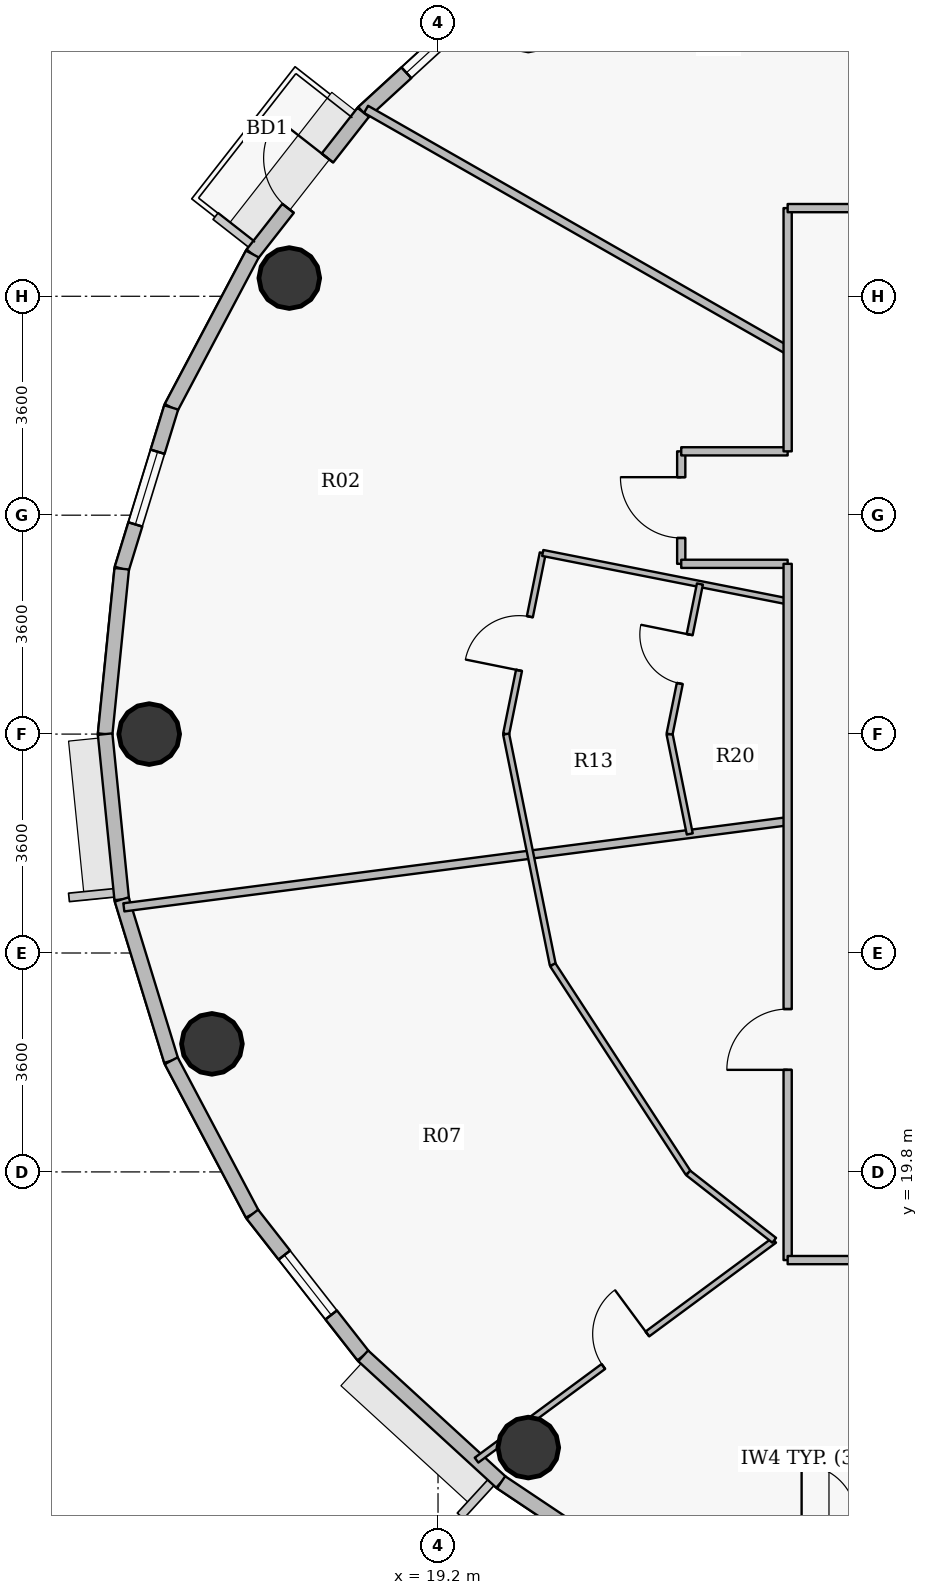
"""IFC4 building model, lengths in metres.
Left out: names, types, materials, properties, quantities, classifications, styles, units other than length and angle.
Written with IfcOpenShell. Run it as: python <this file> out.ifc"""

import sys

from ifc_helpers import new_model, si_unit, direction, frame, frame_2d, origin, origin_2d, place, context, subcontext, project, spatial, rectangle, hollow_circle, extrude, source, transform, mapped, element, fill, save


model = new_model("IFC4")
c1 = context("Model", 3, precision=1e-05, world=origin(), true_north=direction((0.0, 1.0)))
c2 = subcontext(c1, "Body", "Model", "MODEL_VIEW")
j1 = project(units=[si_unit("LENGTHUNIT", "METRE"), si_unit("PLANEANGLEUNIT", "RADIAN")], contexts=[c1])
p1 = place(None, origin())
s1 = spatial("IfcSite", under=j1, at=p1, CompositionType="ELEMENT")
p2 = place(p1, origin())
s2 = spatial("IfcBuilding", under=s1, at=p2, CompositionType="ELEMENT")
p3 = place(p2, frame((0.0, 0.0, 299.25)))
s3 = spatial("IfcBuildingStorey", under=s2, at=p3, CompositionType="ELEMENT", Elevation=299.25)
for number, where, z_axis, x_axis in (
    (1, (16.754, 34.5, 0.0), (0.0, 0.0, 1.0), (1.0, 0.0, 0.0)),
    (2, (14.45, 27.0, 0.0), (0.0, 0.0, 1.0), (1.0, 0.0, 0.0)),
    (3, (15.481, 21.906, 0.0), (0.0, 0.0, 1.0), (1.0, 0.0, 0.0)),
    (4, (20.685, 15.267, 0.0), (0.0, 0.0, 1.0), (1.0, 0.0, 0.0)),
):
    element("IfcColumn", number, at=place(p3, frame(where, z_axis=z_axis, x_axis=x_axis)), inside=s3, PredefinedType="COLUMN", context=c2, shape_type="SweptSolid", body=[
        extrude(hollow_circle(Radius=0.5, WallThickness=0.032, at=origin_2d()), origin(), (0.0, 0.0, 1.0), 3.75),
    ])
p4 = place(p3, frame((17.97, 37.225, 0.0), z_axis=(0.0, 0.0, 1.0), x_axis=(0.737068506972, 0.675818034703, 0.0)))
e5 = element("IfcWall", 5, at=p4, inside=s3, PredefinedType="SOLIDWALL", context=c2, shape_type="SweptSolid", body=[
    extrude(rectangle(XDim=3.077, YDim=0.24, at=frame_2d((1.539, 0.0))), origin(), (0.0, 0.0, 1.0), 3.5),
])
p5 = place(p4, frame((0.963, 0.0, 0.9)))
e6 = element("IfcOpeningElement", 6, at=p5, cuts=e5, PredefinedType="OPENING", context=c2, shape_type="SweptSolid", body=[
    extrude(rectangle(XDim=1.25, YDim=1.65, at=origin_2d()), frame((0.625, 0.13, 0.825), z_axis=(0.0, -1.0, 0.0), x_axis=(1.0, 0.0, 0.0)), (0.0, 0.0, 1.0), 0.26),
])
p6 = place(p3, frame((16.146, 34.895, 0.0), z_axis=(0.0, 0.0, 1.0), x_axis=(0.616337186556, 0.787482363275, 0.0)))
e7 = element("IfcWall", 7, at=p6, inside=s3, PredefinedType="SOLIDWALL", context=c2, shape_type="SweptSolid", body=[
    extrude(rectangle(XDim=2.958, YDim=0.24, at=frame_2d((1.479, 0.0))), origin(), (0.0, 0.0, 1.0), 3.5),
])
p7 = place(p6, frame((0.954, 0.0, 0.0)))
e8 = element("IfcOpeningElement", 8, at=p7, cuts=e7, PredefinedType="OPENING", context=c2, shape_type="SweptSolid", body=[
    extrude(rectangle(XDim=1.05, YDim=2.15, at=origin_2d()), frame((0.525, 0.13, 1.075), z_axis=(0.0, -1.0, 0.0), x_axis=(1.0, 0.0, 0.0)), (0.0, 0.0, 1.0), 0.26),
])
p8 = place(p3, frame((14.812, 32.372, 0.0), z_axis=(0.0, 0.0, 1.0), x_axis=(0.467628269026, 0.883925224218, 0.0)))
e9 = element("IfcWall", 9, at=p8, inside=s3, PredefinedType="SOLIDWALL", context=c2, shape_type="SweptSolid", body=[
    extrude(rectangle(XDim=2.854, YDim=0.24, at=frame_2d((1.427, 0.0))), origin(), (0.0, 0.0, 1.0), 3.5),
])
p9 = place(p3, frame((13.998, 29.719, 0.0), z_axis=(0.0, 0.0, 1.0), x_axis=(0.2931213403, 0.956075248012, 0.0)))
e10 = element("IfcWall", 10, at=p9, inside=s3, PredefinedType="SOLIDWALL", context=c2, shape_type="SweptSolid", body=[
    extrude(rectangle(XDim=2.775, YDim=0.24, at=frame_2d((1.388, 0.0))), origin(), (0.0, 0.0, 1.0), 3.5),
])
p10 = place(p9, frame((0.763, 0.0, 0.9)))
e11 = element("IfcOpeningElement", 11, at=p10, cuts=e10, PredefinedType="OPENING", context=c2, shape_type="SweptSolid", body=[
    extrude(rectangle(XDim=1.25, YDim=1.65, at=origin_2d()), frame((0.625, 0.13, 0.825), z_axis=(0.0, -1.0, 0.0), x_axis=(1.0, 0.0, 0.0)), (0.0, 0.0, 1.0), 0.26),
])
for number, where, z_axis, x_axis in (
    (12, (13.725, 27.0, 0.0), (0.0, 0.0, 1.0), (0.1, 0.995, 0.0)),
    (13, (13.998, 24.281, 0.0), (0.0, 0.0, 1.0), (-0.1, 0.995, 0.0)),
):
    element("IfcWall", number, at=place(p3, frame(where, z_axis=z_axis, x_axis=x_axis)), inside=s3, PredefinedType="SOLIDWALL", context=c2, shape_type="SweptSolid", body=[
        extrude(rectangle(XDim=2.733, YDim=0.24, at=frame_2d((1.366, 0.0))), origin(), (0.0, 0.0, 1.0), 3.5),
    ])
p11 = place(p3, frame((14.812, 21.628, 0.0), z_axis=(0.0, 0.0, 1.0), x_axis=(-0.2931213403, 0.956075248012, 0.0)))
e14 = element("IfcWall", 14, at=p11, inside=s3, PredefinedType="SOLIDWALL", context=c2, shape_type="SweptSolid", body=[
    extrude(rectangle(XDim=2.775, YDim=0.24, at=frame_2d((1.388, 0.0))), origin(), (0.0, 0.0, 1.0), 3.5),
])
p12 = place(p3, frame((16.146, 19.105, 0.0), z_axis=(0.0, 0.0, 1.0), x_axis=(-0.467628269026, 0.883925224218, 0.0)))
e15 = element("IfcWall", 15, at=p12, inside=s3, PredefinedType="SOLIDWALL", context=c2, shape_type="SweptSolid", body=[
    extrude(rectangle(XDim=2.854, YDim=0.24, at=frame_2d((1.427, 0.0))), origin(), (0.0, 0.0, 1.0), 3.5),
])
p13 = place(p3, frame((17.97, 16.775, 0.0), z_axis=(0.0, 0.0, 1.0), x_axis=(-0.616337186556, 0.787482363275, 0.0)))
e16 = element("IfcWall", 16, at=p13, inside=s3, PredefinedType="SOLIDWALL", context=c2, shape_type="SweptSolid", body=[
    extrude(rectangle(XDim=2.958, YDim=0.24, at=frame_2d((1.479, 0.0))), origin(), (0.0, 0.0, 1.0), 3.5),
])
p14 = place(p13, frame((0.854, 0.0, 0.9)))
e17 = element("IfcOpeningElement", 17, at=p14, cuts=e16, PredefinedType="OPENING", context=c2, shape_type="SweptSolid", body=[
    extrude(rectangle(XDim=1.25, YDim=1.65, at=origin_2d()), frame((0.625, 0.13, 0.825), z_axis=(0.0, -1.0, 0.0), x_axis=(1.0, 0.0, 0.0)), (0.0, 0.0, 1.0), 0.26),
])
p15 = place(p3, frame((20.238, 14.696, 0.0), z_axis=(0.0, 0.0, 1.0), x_axis=(-0.737068506972, 0.675818034703, 0.0)))
e18 = element("IfcWall", 18, at=p15, inside=s3, PredefinedType="SOLIDWALL", context=c2, shape_type="SweptSolid", body=[
    extrude(rectangle(XDim=3.077, YDim=0.24, at=frame_2d((1.539, 0.0))), origin(), (0.0, 0.0, 1.0), 3.5),
])
p16 = place(p3, frame((22.896, 12.918, 0.0), z_axis=(0.0, 0.0, 1.0), x_axis=(-0.831250592635, 0.55589787933, 0.0)))
e19 = element("IfcWall", 19, at=p16, inside=s3, PredefinedType="SOLIDWALL", context=c2, shape_type="SweptSolid", body=[
    extrude(rectangle(XDim=3.197, YDim=0.24, at=frame_2d((1.599, 0.0))), origin(), (0.0, 0.0, 1.0), 3.5),
])
p17 = place(p16, frame((0.458, 0.0, 0.9)))
e20 = element("IfcOpeningElement", 20, at=p17, cuts=e19, PredefinedType="OPENING", context=c2, shape_type="SweptSolid", body=[
    extrude(rectangle(XDim=1.25, YDim=1.65, at=origin_2d()), frame((0.625, 0.13, 0.825), z_axis=(0.0, -1.0, 0.0), x_axis=(1.0, 0.0, 0.0)), (0.0, 0.0, 1.0), 0.26),
])
p18 = place(p3, frame((14.033, 24.151, 0.0), z_axis=(0.0, 0.0, 1.0), x_axis=(0.99169266035, 0.128629963101, 0.0)))
e21 = element("IfcWall", 21, at=p18, inside=s3, PredefinedType="PARTITIONING", context=c2, shape_type="SweptSolid", body=[
    extrude(rectangle(XDim=11.009, YDim=0.135, at=frame_2d((5.504, 0.0))), origin(), (0.0, 0.0, 1.0), 2.985),
])
p19 = place(p3, frame((18.016, 37.274, 0.0), z_axis=(0.0, 0.0, 1.0), x_axis=(0.868277005727, -0.496079672357, 0.0)))
e22 = element("IfcWall", 22, at=p19, inside=s3, PredefinedType="PARTITIONING", context=c2, shape_type="SweptSolid", body=[
    extrude(rectangle(XDim=7.985, YDim=0.135, at=frame_2d((3.993, 0.0))), origin(), (0.0, 0.0, 1.0), 2.985),
])
p20 = place(p3, frame((19.833, 15.06, 0.0), z_axis=(0.0, 0.0, 1.0), x_axis=(0.804387847123, 0.594104529019, 0.0)))
e23 = element("IfcWall", 23, at=p20, inside=s3, PredefinedType="PARTITIONING", context=c2, shape_type="SweptSolid", body=[
    extrude(rectangle(XDim=6.086, YDim=0.1, at=frame_2d((3.043, 0.0))), origin(), (0.0, 0.0, 1.0), 3.5),
])
p21 = place(p20, frame((2.593, 0.0, 0.0)))
e24 = element("IfcOpeningElement", 24, at=p21, cuts=e23, PredefinedType="OPENING", context=c2, shape_type="SweptSolid", body=[
    extrude(rectangle(XDim=0.9, YDim=2.1, at=origin_2d()), frame((0.45, 0.06, 1.05), z_axis=(0.0, -1.0, 0.0), x_axis=(1.0, 0.0, 0.0)), (0.0, 0.0, 1.0), 0.12),
])
p22 = place(p3, frame((20.32, 27.0, 0.0), z_axis=(0.0, 0.0, 1.0), x_axis=(0.198201469781, 0.980161301713, 0.0)))
e25 = element("IfcWall", 25, at=p22, inside=s3, PredefinedType="PARTITIONING", context=c2, shape_type="SweptSolid", body=[
    extrude(rectangle(XDim=3.039, YDim=0.1, at=frame_2d((1.52, 0.0))), origin(), (0.0, 0.0, 1.0), 3.035),
])
p23 = place(p22, frame((1.069, 0.0, 0.0)))
e26 = element("IfcOpeningElement", 26, at=p23, cuts=e25, PredefinedType="OPENING", context=c2, shape_type="SweptSolid", body=[
    extrude(rectangle(XDim=0.9, YDim=2.1, at=origin_2d()), frame((0.45, 0.06, 1.05), z_axis=(0.0, -1.0, 0.0), x_axis=(1.0, 0.0, 0.0)), (0.0, 0.0, 1.0), 0.12),
])
p24 = place(p3, frame((20.32, 27.0, 0.0), z_axis=(0.0, 0.0, 1.0), x_axis=(0.198226068862, -0.980156327135, 0.0)))
e27 = element("IfcWall", 27, at=p24, inside=s3, PredefinedType="PARTITIONING", context=c2, shape_type="SweptSolid", body=[
    extrude(rectangle(XDim=3.871, YDim=0.1, at=frame_2d((1.936, 0.0))), origin(), (0.0, 0.0, 1.0), 3.035),
])
p25 = place(p3, frame((20.922, 29.979, 0.0), z_axis=(0.0, 0.0, 1.0), x_axis=(0.981042206934, -0.19379419035, 0.0)))
e28 = element("IfcWall", 28, at=p25, inside=s3, PredefinedType="PARTITIONING", context=c2, shape_type="SweptSolid", body=[
    extrude(rectangle(XDim=4.106, YDim=0.1, at=frame_2d((2.053, 0.0))), origin(), (0.0, 0.0, 1.0), 3.5),
])
p26 = place(p3, frame((21.087, 23.206, 0.0), z_axis=(0.0, 0.0, 1.0), x_axis=(0.545435886628, -0.838152547916, 0.0)))
e29 = element("IfcWall", 29, at=p26, inside=s3, PredefinedType="PARTITIONING", context=c2, shape_type="SweptSolid", body=[
    extrude(rectangle(XDim=4.083, YDim=0.1, at=frame_2d((2.042, 0.0))), origin(), (0.0, 0.0, 1.0), 3.035),
])
p27 = place(p3, frame((23.008, 27.0, 0.0), z_axis=(0.0, 0.0, 1.0), x_axis=(0.198189512146, -0.980163719628, 0.0)))
e30 = element("IfcWall", 30, at=p27, inside=s3, PredefinedType="PARTITIONING", context=c2, shape_type="SweptSolid", body=[
    extrude(rectangle(XDim=1.675, YDim=0.1, at=frame_2d((0.838, 0.0))), origin(), (0.0, 0.0, 1.0), 3.035),
])
p28 = place(p3, frame((23.008, 27.0, 0.0), z_axis=(0.0, 0.0, 1.0), x_axis=(0.19818541272, 0.980164548525, 0.0)))
e31 = element("IfcWall", 31, at=p28, inside=s3, PredefinedType="PARTITIONING", context=c2, shape_type="SweptSolid", body=[
    extrude(rectangle(XDim=2.518, YDim=0.1, at=frame_2d((1.259, 0.0))), origin(), (0.0, 0.0, 1.0), 3.035),
])
p29 = place(p28, frame((0.849, 0.0, 0.0)))
e32 = element("IfcOpeningElement", 32, at=p29, cuts=e31, PredefinedType="OPENING", context=c2, shape_type="SweptSolid", body=[
    extrude(rectangle(XDim=0.82, YDim=2.1, at=origin_2d()), frame((0.41, 0.06, 1.05), z_axis=(0.0, -1.0, 0.0), x_axis=(1.0, 0.0, 0.0)), (0.0, 0.0, 1.0), 0.12),
])
p30 = place(p3, frame((23.2, 29.8, 0.0), z_axis=(0.0, 0.0, 1.0), x_axis=(0.0, 1.0, 0.0)))
e33 = element("IfcWall", 33, at=p30, inside=s3, PredefinedType="PARTITIONING", context=c2, shape_type="SweptSolid", body=[
    extrude(rectangle(XDim=1.85, YDim=0.135, at=frame_2d((0.925, 0.0))), origin(), (0.0, 0.0, 1.0), 3.185),
])
p31 = place(p30, frame((0.425, 0.0, 0.0)))
e34 = element("IfcOpeningElement", 34, at=p31, cuts=e33, PredefinedType="OPENING", context=c2, shape_type="SweptSolid", body=[
    extrude(rectangle(XDim=1.0, YDim=2.15, at=origin_2d()), frame((0.5, 0.078, 1.075), z_axis=(0.0, -1.0, 0.0), x_axis=(1.0, 0.0, 0.0)), (0.0, 0.0, 1.0), 0.155),
])
p32 = place(p3, frame((23.2, 29.8, 0.0), z_axis=(0.0, 0.0, 1.0), x_axis=(1.0, 0.0, 0.0)))
e35 = element("IfcWall", 35, at=p32, inside=s3, PredefinedType="PARTITIONING", context=c2, shape_type="SweptSolid", body=[
    extrude(rectangle(XDim=1.75, YDim=0.135, at=frame_2d((0.875, 0.0))), origin(), (0.0, 0.0, 1.0), 3.5),
])
p33 = place(p3, frame((23.2, 31.65, 0.0), z_axis=(0.0, 0.0, 1.0), x_axis=(1.0, 0.0, 0.0)))
e36 = element("IfcWall", 36, at=p33, inside=s3, PredefinedType="PARTITIONING", context=c2, shape_type="SweptSolid", body=[
    extrude(rectangle(XDim=1.75, YDim=0.135, at=frame_2d((0.875, 0.0))), origin(), (0.0, 0.0, 1.0), 3.035),
])
p34 = place(p3, frame((23.315, 19.783, 0.0), z_axis=(0.0, 0.0, 1.0), x_axis=(0.787284128546, -0.616590383431, 0.0)))
e37 = element("IfcWall", 37, at=p34, inside=s3, PredefinedType="PARTITIONING", context=c2, shape_type="SweptSolid", body=[
    extrude(rectangle(XDim=1.796, YDim=0.1, at=frame_2d((0.898, 0.0))), origin(), (0.0, 0.0, 1.0), 3.5),
])
p35 = place(p3, frame((24.95, 18.35, 0.0), z_axis=(0.0, 0.0, 1.0), x_axis=(0.0, 1.0, 0.0)))
e38 = element("IfcWall", 38, at=p35, inside=s3, PredefinedType="PARTITIONING", context=c2, shape_type="SweptSolid", body=[
    extrude(rectangle(XDim=11.45, YDim=0.135, at=frame_2d((5.725, 0.0))), origin(), (0.0, 0.0, 1.0), 3.035),
])
p36 = place(p35, frame((3.128, 0.0, 0.0)))
e39 = element("IfcOpeningElement", 39, at=p36, cuts=e38, PredefinedType="OPENING", context=c2, shape_type="SweptSolid", body=[
    extrude(rectangle(XDim=1.0, YDim=2.15, at=origin_2d()), frame((0.5, 0.078, 1.075), z_axis=(0.0, -1.0, 0.0), x_axis=(1.0, 0.0, 0.0)), (0.0, 0.0, 1.0), 0.155),
])
p37 = place(p3, frame((24.95, 18.35, 0.0), z_axis=(0.0, 0.0, 1.0), x_axis=(1.0, 0.0, 0.0)))
e40 = element("IfcWall", 40, at=p37, inside=s3, PredefinedType="PARTITIONING", context=c2, shape_type="SweptSolid", body=[
    extrude(rectangle(XDim=22.1, YDim=0.135, at=frame_2d((11.05, 0.0))), origin(), (0.0, 0.0, 1.0), 3.035),
])
p38 = place(p37, frame((8.131, 0.0, 0.0)))
e41 = element("IfcOpeningElement", 41, at=p38, cuts=e40, PredefinedType="OPENING", context=c2, shape_type="SweptSolid", body=[
    extrude(rectangle(XDim=1.0, YDim=2.15, at=origin_2d()), frame((0.5, 0.078, 1.075), z_axis=(0.0, -1.0, 0.0), x_axis=(1.0, 0.0, 0.0)), (0.0, 0.0, 1.0), 0.155),
])
p39 = place(p37, frame((19.081, 0.0, 0.0)))
e42 = element("IfcOpeningElement", 42, at=p39, cuts=e40, PredefinedType="OPENING", context=c2, shape_type="SweptSolid", body=[
    extrude(rectangle(XDim=1.0, YDim=2.15, at=origin_2d()), frame((0.5, 0.078, 1.075), z_axis=(0.0, -1.0, 0.0), x_axis=(1.0, 0.0, 0.0)), (0.0, 0.0, 1.0), 0.155),
])
p40 = place(p3, frame((24.95, 31.65, 0.0), z_axis=(0.0, 0.0, 1.0), x_axis=(0.0, 1.0, 0.0)))
e43 = element("IfcWall", 43, at=p40, inside=s3, PredefinedType="PARTITIONING", context=c2, shape_type="SweptSolid", body=[
    extrude(rectangle(XDim=4.0, YDim=0.135, at=frame_2d((2.0, 0.0))), origin(), (0.0, 0.0, 1.0), 3.035),
])
p41 = place(p3, frame((24.95, 35.65, 0.0), z_axis=(0.0, 0.0, 1.0), x_axis=(1.0, 0.0, 0.0)))
e44 = element("IfcWall", 44, at=p41, inside=s3, PredefinedType="PARTITIONING", context=c2, shape_type="SweptSolid", body=[
    extrude(rectangle(XDim=10.1, YDim=0.135, at=frame_2d((5.05, 0.0))), origin(), (0.0, 0.0, 1.0), 3.035),
])
p42 = place(p41, frame((1.192, 0.0, 0.0)))
e45 = element("IfcOpeningElement", 45, at=p42, cuts=e44, PredefinedType="OPENING", context=c2, shape_type="SweptSolid", body=[
    extrude(rectangle(XDim=1.0, YDim=2.15, at=origin_2d()), frame((0.5, 0.078, 1.075), z_axis=(0.0, -1.0, 0.0), x_axis=(1.0, 0.0, 0.0)), (0.0, 0.0, 1.0), 0.155),
])
m1 = source(origin(), c2, "Body", "SweptSolid", [
    extrude(rectangle(XDim=1.25, YDim=1.65, at=origin_2d()), frame((0.625, 0.03, 0.825), z_axis=(0.0, -1.0, 0.0), x_axis=(1.0, 0.0, 0.0)), (0.0, 0.0, 1.0), 0.06),
])
p43 = place(p5, origin())
e46 = element("IfcWindow", 46, at=p43, inside=s3, PartitioningType="SINGLE_PANEL", PredefinedType="WINDOW", context=c2, shape_type="MappedRepresentation", body=[
    mapped(m1, transform((0.0, 0.0, 0.0), x_axis=(1.0, 0.0, 0.0), y_axis=(0.0, 1.0, 0.0), z_axis=(0.0, 0.0, 1.0), scale=1.0)),
])
fill(e6, e46)
m2 = source(origin(), c2, "Body", "SweptSolid", [
    extrude(rectangle(XDim=1.05, YDim=2.15, at=origin_2d()), frame((0.525, 0.025, 1.075), z_axis=(0.0, -1.0, 0.0), x_axis=(1.0, 0.0, 0.0)), (0.0, 0.0, 1.0), 0.05),
])
p44 = place(p7, origin())
e47 = element("IfcDoor", 47, at=p44, inside=s3, OperationType="SINGLE_SWING_RIGHT", PredefinedType="DOOR", context=c2, shape_type="MappedRepresentation", body=[
    mapped(m2, transform((0.0, 0.0, 0.0), x_axis=(1.0, 0.0, 0.0), y_axis=(0.0, 1.0, 0.0), z_axis=(0.0, 0.0, 1.0), scale=1.0)),
])
fill(e8, e47)
p45 = place(p10, origin())
e48 = element("IfcWindow", 48, at=p45, inside=s3, PartitioningType="SINGLE_PANEL", PredefinedType="WINDOW", context=c2, shape_type="MappedRepresentation", body=[
    mapped(m1, transform((0.0, 0.0, 0.0), x_axis=(1.0, 0.0, 0.0), y_axis=(0.0, 1.0, 0.0), z_axis=(0.0, 0.0, 1.0), scale=1.0)),
])
fill(e11, e48)
p46 = place(p14, origin())
e49 = element("IfcWindow", 49, at=p46, inside=s3, PartitioningType="SINGLE_PANEL", PredefinedType="WINDOW", context=c2, shape_type="MappedRepresentation", body=[
    mapped(m1, transform((0.0, 0.0, 0.0), x_axis=(1.0, 0.0, 0.0), y_axis=(0.0, 1.0, 0.0), z_axis=(0.0, 0.0, 1.0), scale=1.0)),
])
fill(e17, e49)
m3 = source(origin(), c2, "Body", "SweptSolid", [
    extrude(rectangle(XDim=1.0, YDim=2.15, at=origin_2d()), frame((0.5, 0.025, 1.075), z_axis=(0.0, -1.0, 0.0), x_axis=(1.0, 0.0, 0.0)), (0.0, 0.0, 1.0), 0.05),
])
p47 = place(p31, origin())
e50 = element("IfcDoor", 50, at=p47, inside=s3, OperationType="SINGLE_SWING_RIGHT", PredefinedType="DOOR", context=c2, shape_type="MappedRepresentation", body=[
    mapped(m3, transform((0.0, 0.0, 0.0), x_axis=(1.0, 0.0, 0.0), y_axis=(0.0, 1.0, 0.0), z_axis=(0.0, 0.0, 1.0), scale=1.0)),
])
fill(e34, e50)
m4 = source(origin(), c2, "Body", "SweptSolid", [
    extrude(rectangle(XDim=0.9, YDim=2.1, at=origin_2d()), frame((0.45, 0.025, 1.05), z_axis=(0.0, -1.0, 0.0), x_axis=(1.0, 0.0, 0.0)), (0.0, 0.0, 1.0), 0.05),
])
p48 = place(p23, origin())
e51 = element("IfcDoor", 51, at=p48, inside=s3, OperationType="SINGLE_SWING_LEFT", PredefinedType="DOOR", context=c2, shape_type="MappedRepresentation", body=[
    mapped(m4, transform((0.0, 0.0, 0.0), x_axis=(1.0, 0.0, 0.0), y_axis=(0.0, 1.0, 0.0), z_axis=(0.0, 0.0, 1.0), scale=1.0)),
])
fill(e26, e51)
m5 = source(origin(), c2, "Body", "SweptSolid", [
    extrude(rectangle(XDim=0.82, YDim=2.1, at=origin_2d()), frame((0.41, 0.025, 1.05), z_axis=(0.0, -1.0, 0.0), x_axis=(1.0, 0.0, 0.0)), (0.0, 0.0, 1.0), 0.05),
])
p49 = place(p29, origin())
e52 = element("IfcDoor", 52, at=p49, inside=s3, OperationType="SINGLE_SWING_RIGHT", PredefinedType="DOOR", context=c2, shape_type="MappedRepresentation", body=[
    mapped(m5, transform((0.0, 0.0, 0.0), x_axis=(1.0, 0.0, 0.0), y_axis=(0.0, 1.0, 0.0), z_axis=(0.0, 0.0, 1.0), scale=1.0)),
])
fill(e32, e52)
p50 = place(p36, origin())
e53 = element("IfcDoor", 53, at=p50, inside=s3, OperationType="SINGLE_SWING_LEFT", PredefinedType="DOOR", context=c2, shape_type="MappedRepresentation", body=[
    mapped(m3, transform((0.0, 0.0, 0.0), x_axis=(1.0, 0.0, 0.0), y_axis=(0.0, 1.0, 0.0), z_axis=(0.0, 0.0, 1.0), scale=1.0)),
])
fill(e39, e53)
p51 = place(p21, origin())
e54 = element("IfcDoor", 54, at=p51, inside=s3, OperationType="SINGLE_SWING_RIGHT", PredefinedType="DOOR", context=c2, shape_type="MappedRepresentation", body=[
    mapped(m4, transform((0.0, 0.0, 0.0), x_axis=(1.0, 0.0, 0.0), y_axis=(0.0, 1.0, 0.0), z_axis=(0.0, 0.0, 1.0), scale=1.0)),
])
fill(e24, e54)
save(model, sys.argv[1])
